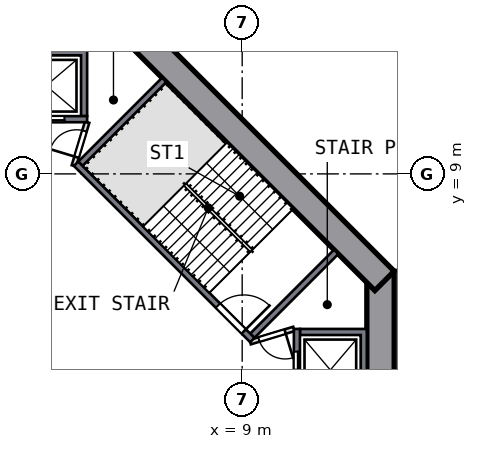
"""IFC4 building model, lengths in metres.
Left out: names, types, materials, properties, quantities, classifications, styles, units other than length and angle.
Written with IfcOpenShell. Run it as: python <this file> out.ifc"""

import sys

from ifc_helpers import new_model, si_unit, direction, frame, frame_2d, origin, place, context, subcontext, project, spatial, polyline, rectangle, outline, extrude, element, fill, save


model = new_model("IFC4")
c1 = context("Model", 3, precision=1e-05, world=origin(), true_north=direction((0.0, 1.0)))
c2 = subcontext(c1, "Body", "Model", "MODEL_VIEW")
j1 = project(units=[si_unit("LENGTHUNIT", "METRE"), si_unit("PLANEANGLEUNIT", "RADIAN")], contexts=[c1])
p1 = place(None, origin())
s1 = spatial("IfcSite", under=j1, at=p1, CompositionType="ELEMENT")
p2 = place(p1, origin())
s2 = spatial("IfcBuilding", under=s1, at=p2, CompositionType="ELEMENT")
p3 = place(p2, frame((0.0, 0.0, -3.9)))
s3 = spatial("IfcBuildingStorey", under=s2, at=p3, CompositionType="ELEMENT", Elevation=-3.9)
p4 = place(p3, frame((13.55, -5.799, 0.0), z_axis=(0.0, 0.0, 1.0), x_axis=(0.0, 1.0, 0.0)))
e1 = element("IfcWall", 1, at=p4, inside=s3, PredefinedType="SHEAR", context=c2, shape_type="SweptSolid", body=[
    extrude(rectangle(XDim=11.598, YDim=0.9, at=frame_2d((5.799, 0.0))), origin(), (0.0, 0.0, 1.0), 3.9),
])
p5 = place(p4, frame((4.899, 0.0, 0.0)))
e2 = element("IfcOpeningElement", 2, at=p5, cuts=e1, PredefinedType="OPENING", context=c2, shape_type="SweptSolid", body=[
    extrude(rectangle(XDim=1.8, YDim=2.1, at=frame_2d((0.9, 1.05))), frame((0.0, 0.46, 0.0), z_axis=(0.0, -1.0, 0.0), x_axis=(1.0, 0.0, 0.0)), (0.0, 0.0, 1.0), 0.92),
])
p6 = place(p3, frame((13.682, 5.481, 0.0), z_axis=(0.0, 0.0, 1.0), x_axis=(-0.707106781, 0.707106781, 0.0)))
e3 = element("IfcWall", 3, at=p6, inside=s3, PredefinedType="SHEAR", context=c2, shape_type="SweptSolid", body=[
    extrude(rectangle(XDim=11.598, YDim=0.9, at=frame_2d((5.799, 0.0))), origin(), (0.0, 0.0, 1.0), 3.9),
])
p7 = place(p3, origin())
e4 = element("IfcWall", 4, at=p7, inside=s3, PredefinedType="SOLIDWALL", context=c2, shape_type="SweptSolid", body=[
    extrude(outline(polyline([(13.1, 3.9), (13.1, 1.2), (10.9, 1.2), (10.9, 1.4), (12.9, 1.4), (12.9, 3.7), (10.9, 3.7), (10.9, 3.9), (13.1, 3.9)])), origin(), (0.0, 0.0, 1.0), 3.45),
])
p8 = place(p3, frame((10.8, 1.2, 0.0), z_axis=(0.0, 0.0, 1.0), x_axis=(0.0, 1.0, 0.0)))
e5 = element("IfcWall", 5, at=p8, inside=s3, PredefinedType="SOLIDWALL", context=c2, shape_type="SweptSolid", body=[
    extrude(rectangle(XDim=2.7, YDim=0.2, at=frame_2d((1.35, 0.0))), origin(), (0.0, 0.0, 1.0), 3.45),
])
p9 = place(p8, frame((0.75, 0.0, 0.0)))
e6 = element("IfcOpeningElement", 6, at=p9, cuts=e5, PredefinedType="OPENING", context=c2, shape_type="SweptSolid", body=[
    extrude(rectangle(XDim=1.2, YDim=2.1, at=frame_2d((0.6, 1.05))), frame((0.0, 0.11, 0.0), z_axis=(0.0, -1.0, 0.0), x_axis=(1.0, 0.0, 0.0)), (0.0, 0.0, 1.0), 0.22),
])
p10 = place(p3, origin())
e7 = element("IfcWall", 7, at=p10, inside=s3, PredefinedType="SOLIDWALL", context=c2, shape_type="SweptSolid", body=[
    extrude(outline(polyline([(3.9, 13.1), (3.9, 10.9), (3.7, 10.9), (3.7, 12.9), (1.4, 12.9), (1.4, 10.9), (1.2, 10.9), (1.2, 13.1), (3.9, 13.1)])), origin(), (0.0, 0.0, 1.0), 3.45),
])
p11 = place(p3, frame((1.2, 10.8, 0.0), z_axis=(0.0, 0.0, 1.0), x_axis=(1.0, 0.0, 0.0)))
e8 = element("IfcWall", 8, at=p11, inside=s3, PredefinedType="SOLIDWALL", context=c2, shape_type="SweptSolid", body=[
    extrude(rectangle(XDim=2.7, YDim=0.2, at=frame_2d((1.35, 0.0))), origin(), (0.0, 0.0, 1.0), 3.45),
])
p12 = place(p11, frame((0.75, 0.0, 0.0)))
e9 = element("IfcOpeningElement", 9, at=p12, cuts=e8, PredefinedType="OPENING", context=c2, shape_type="SweptSolid", body=[
    extrude(rectangle(XDim=1.2, YDim=2.1, at=frame_2d((0.6, 1.05))), frame((0.0, 0.11, 0.0), z_axis=(0.0, -1.0, 0.0), x_axis=(1.0, 0.0, 0.0)), (0.0, 0.0, 1.0), 0.22),
])
p13 = place(p3, frame((3.535, 9.334, 0.0), z_axis=(0.0, 0.0, 1.0), x_axis=(0.707106781, -0.707106781, 0.0)))
e10 = element("IfcWall", 10, at=p13, inside=s3, PredefinedType="SOLIDWALL", context=c2, shape_type="SweptSolid", body=[
    extrude(rectangle(XDim=8.2, YDim=0.2, at=frame_2d((4.1, 0.0))), origin(), (0.0, 0.0, 1.0), 3.45),
])
p14 = place(p13, frame((6.6, 0.0, 0.0)))
e11 = element("IfcOpeningElement", 11, at=p14, cuts=e10, PredefinedType="OPENING", context=c2, shape_type="SweptSolid", body=[
    extrude(rectangle(XDim=1.2, YDim=2.1, at=frame_2d((0.6, 1.05))), frame((0.0, 0.11, 0.0), z_axis=(0.0, -1.0, 0.0), x_axis=(1.0, 0.0, 0.0)), (0.0, 0.0, 1.0), 0.22),
])
for number, where, z_axis, x_axis in (
    (12, (9.334, 3.677, 0.0), (0.0, 0.0, 1.0), (0.707, 0.707, 0.0)),
    (13, (3.677, 9.334, 0.0), (0.0, 0.0, 1.0), (0.707, 0.707, 0.0)),
):
    element("IfcWall", number, at=place(p3, frame(where, z_axis=z_axis, x_axis=x_axis)), inside=s3, PredefinedType="SOLIDWALL", context=c2, shape_type="SweptSolid", body=[
        extrude(rectangle(XDim=3.9, YDim=0.2, at=frame_2d((1.95, 0.0))), origin(), (0.0, 0.0, 1.0), 3.45),
    ])
p15 = place(p3, frame((10.7, 3.9, 0.0), z_axis=(0.0, 0.0, 1.0), x_axis=(-0.957084567, -0.289808785, 0.0)))
e14 = element("IfcWall", 14, at=p15, inside=s3, PredefinedType="PARTITIONING", context=c2, shape_type="SweptSolid", body=[
    extrude(rectangle(XDim=1.501, YDim=0.15, at=frame_2d((0.75, 0.0))), origin(), (0.0, 0.0, 1.0), 3.45),
])
p16 = place(p15, frame((0.301, 0.0, 0.0)))
e15 = element("IfcOpeningElement", 15, at=p16, cuts=e14, PredefinedType="OPENING", context=c2, shape_type="SweptSolid", body=[
    extrude(rectangle(XDim=0.9, YDim=2.1, at=frame_2d((0.45, 1.05))), frame((0.0, 0.085, 0.0), z_axis=(0.0, -1.0, 0.0), x_axis=(1.0, 0.0, 0.0)), (0.0, 0.0, 1.0), 0.17),
])
p17 = place(p3, frame((3.465, 9.263, 0.0), z_axis=(0.0, 0.0, 1.0), x_axis=(0.289808785, 0.957084567, 0.0)))
e16 = element("IfcWall", 16, at=p17, inside=s3, PredefinedType="PARTITIONING", context=c2, shape_type="SweptSolid", body=[
    extrude(rectangle(XDim=1.501, YDim=0.15, at=frame_2d((0.75, 0.0))), origin(), (0.0, 0.0, 1.0), 3.45),
])
p18 = place(p17, frame((0.301, 0.0, 0.0)))
e17 = element("IfcOpeningElement", 17, at=p18, cuts=e16, PredefinedType="OPENING", context=c2, shape_type="SweptSolid", body=[
    extrude(rectangle(XDim=0.9, YDim=2.1, at=frame_2d((0.45, 1.05))), frame((0.0, 0.085, 0.0), z_axis=(0.0, -1.0, 0.0), x_axis=(1.0, 0.0, 0.0)), (0.0, 0.0, 1.0), 0.17),
])
p19 = place(p9, origin())
e18 = element("IfcDoor", 18, at=p19, inside=s3, OperationType="DOUBLE_DOOR_SLIDING", PredefinedType="DOOR", context=c2, shape_type="SweptSolid", body=[
    extrude(rectangle(XDim=1.2, YDim=2.1, at=frame_2d((0.6, 1.05))), frame((0.0, 0.025, 0.0), z_axis=(0.0, -1.0, 0.0), x_axis=(1.0, 0.0, 0.0)), (0.0, 0.0, 1.0), 0.05),
])
fill(e6, e18)
p20 = place(p12, origin())
e19 = element("IfcDoor", 19, at=p20, inside=s3, OperationType="DOUBLE_DOOR_SLIDING", PredefinedType="DOOR", context=c2, shape_type="SweptSolid", body=[
    extrude(rectangle(XDim=1.2, YDim=2.1, at=frame_2d((0.6, 1.05))), frame((0.0, 0.025, 0.0), z_axis=(0.0, -1.0, 0.0), x_axis=(1.0, 0.0, 0.0)), (0.0, 0.0, 1.0), 0.05),
])
fill(e9, e19)
p21 = place(p14, origin())
e20 = element("IfcDoor", 20, at=p21, inside=s3, OperationType="SINGLE_SWING_RIGHT", PredefinedType="DOOR", context=c2, shape_type="SweptSolid", body=[
    extrude(rectangle(XDim=1.2, YDim=2.1, at=frame_2d((0.6, 1.05))), frame((0.0, 0.025, 0.0), z_axis=(0.0, -1.0, 0.0), x_axis=(1.0, 0.0, 0.0)), (0.0, 0.0, 1.0), 0.05),
])
fill(e11, e20)
p22 = place(p16, origin())
e21 = element("IfcDoor", 21, at=p22, inside=s3, OperationType="SINGLE_SWING_LEFT", PredefinedType="DOOR", context=c2, shape_type="SweptSolid", body=[
    extrude(rectangle(XDim=0.9, YDim=2.1, at=frame_2d((0.45, 1.05))), frame((0.0, 0.025, 0.0), z_axis=(0.0, -1.0, 0.0), x_axis=(1.0, 0.0, 0.0)), (0.0, 0.0, 1.0), 0.05),
])
fill(e15, e21)
p23 = place(p18, origin())
e22 = element("IfcDoor", 22, at=p23, inside=s3, OperationType="SINGLE_SWING_LEFT", PredefinedType="DOOR", context=c2, shape_type="SweptSolid", body=[
    extrude(rectangle(XDim=0.9, YDim=2.1, at=frame_2d((0.45, 1.05))), frame((0.0, 0.025, 0.0), z_axis=(0.0, -1.0, 0.0), x_axis=(1.0, 0.0, 0.0)), (0.0, 0.0, 1.0), 0.05),
])
fill(e17, e22)
save(model, sys.argv[1])
